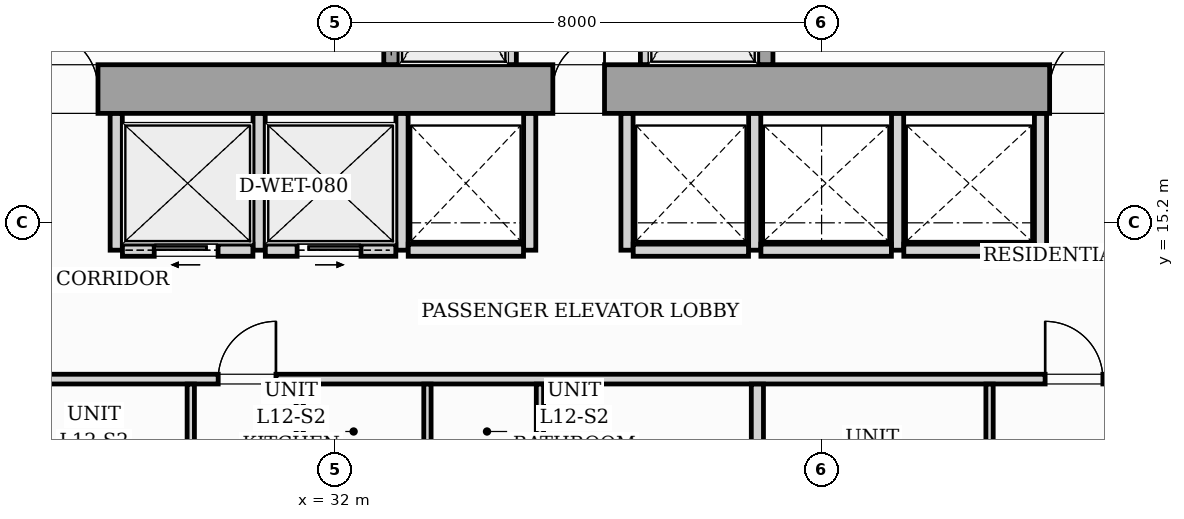
"""IFC4 building model, lengths in metres.
Left out: names, types, materials, properties, quantities, classifications, styles, units other than length and angle.
Written with IfcOpenShell. Run it as: python <this file> out.ifc"""

import sys

from ifc_helpers import new_model, si_unit, direction, frame, frame_2d, origin, origin_2d, place, context, subcontext, project, spatial, rectangle, i_section, extrude, source, transform, mapped, element, fill, save


model = new_model("IFC4")
c1 = context("Model", 3, precision=1e-05, world=origin(), true_north=direction((0.0, 1.0)))
c2 = subcontext(c1, "Body", "Model", "MODEL_VIEW")
j1 = project(units=[si_unit("LENGTHUNIT", "METRE"), si_unit("PLANEANGLEUNIT", "RADIAN")], contexts=[c1])
p1 = place(None, origin())
s1 = spatial("IfcSite", under=j1, at=p1, CompositionType="ELEMENT")
p2 = place(p1, origin())
s2 = spatial("IfcBuilding", under=s1, at=p2, CompositionType="ELEMENT")
p3 = place(p2, frame((0.0, 0.0, 45.4)))
s3 = spatial("IfcBuildingStorey", under=s2, at=p3, CompositionType="ELEMENT", Elevation=45.4)
m1 = source(origin(), c2, "Body", "SweptSolid", [
    extrude(i_section(OverallWidth=0.437, OverallDepth=0.514, WebThickness=0.061, FlangeThickness=0.097, FilletRadius=0.018, at=origin_2d()), origin(), (0.0, 0.0, 1.0), 3.196),
])
for number, where, z_axis, x_axis in (
    (1, (33.12, 17.4, 0.002), (0.0, 0.0, 1.0), (1.0, 0.0, 0.0)),
    (2, (38.88, 17.4, 0.002), (0.0, 0.0, 1.0), (1.0, 0.0, 0.0)),
):
    element("IfcColumn", number, at=place(p3, frame(where, z_axis=z_axis, x_axis=x_axis)), inside=s3, PredefinedType="PILASTER", context=c2, shape_type="MappedRepresentation", body=[
        mapped(m1, transform((0.0, 0.0, 0.0), scale=1.0)),
    ])
p4 = place(p3, frame((26.0, 17.4, 0.0), z_axis=(0.0, 0.0, 1.0), x_axis=(1.0, 0.0, 0.0)))
e3 = element("IfcWall", 3, at=p4, inside=s3, PredefinedType="SHEAR", context=c2, shape_type="SweptSolid", body=[
    extrude(rectangle(XDim=20.0, YDim=0.8, at=frame_2d((10.0, 0.0))), origin(), (0.0, 0.0, 1.0), 3.2),
])
p5 = place(p4, frame((1.15, 0.0, 0.0)))
e4 = element("IfcOpeningElement", 4, at=p5, cuts=e3, PredefinedType="OPENING", context=c2, shape_type="SweptSolid", body=[
    extrude(rectangle(XDim=0.95, YDim=2.06, at=frame_2d((0.475, 1.03))), frame((0.0, 0.41, 0.0), z_axis=(0.0, -1.0, 0.0), x_axis=(1.0, 0.0, 0.0)), (0.0, 0.0, 1.0), 0.82),
])
p6 = place(p4, frame((9.58, 0.0, 0.0)))
e5 = element("IfcOpeningElement", 5, at=p6, cuts=e3, PredefinedType="OPENING", context=c2, shape_type="SweptSolid", body=[
    extrude(rectangle(XDim=0.85, YDim=2.0, at=frame_2d((0.425, 1.0))), frame((0.0, 0.41, 0.0), z_axis=(0.0, -1.0, 0.0), x_axis=(1.0, 0.0, 0.0)), (0.0, 0.0, 1.0), 0.82),
])
p7 = place(p4, frame((17.75, 0.0, 0.0)))
e6 = element("IfcOpeningElement", 6, at=p7, cuts=e3, PredefinedType="OPENING", context=c2, shape_type="SweptSolid", body=[
    extrude(rectangle(XDim=0.95, YDim=2.06, at=frame_2d((0.475, 1.03))), frame((0.0, 0.41, 0.0), z_axis=(0.0, -1.0, 0.0), x_axis=(1.0, 0.0, 0.0)), (0.0, 0.0, 1.0), 0.82),
])
p8 = place(p3, frame((32.925, 17.802, 0.0), z_axis=(0.0, 0.0, 1.0), x_axis=(0.0, 1.0, 0.0)))
e7 = element("IfcWall", 7, at=p8, inside=s3, PredefinedType="SOLIDWALL", context=c2, shape_type="SweptSolid", body=[
    extrude(rectangle(XDim=2.646, YDim=0.25, at=frame_2d((1.323, 0.0))), origin(), (0.0, 0.0, 1.0), 3.2),
])
p9 = place(p8, frame((0.648, 0.0, 0.0)))
e8 = element("IfcOpeningElement", 8, at=p9, cuts=e7, PredefinedType="OPENING", context=c2, shape_type="SweptSolid", body=[
    extrude(rectangle(XDim=1.1, YDim=2.08, at=frame_2d((0.55, 1.04))), frame((0.0, 0.135, 0.0), z_axis=(0.0, -1.0, 0.0), x_axis=(1.0, 0.0, 0.0)), (0.0, 0.0, 1.0), 0.27),
])
for number, where, z_axis, x_axis in (
    (9, (34.9, 17.802, 0.0), (0.0, 0.0, 1.0), (0.0, 1.0, 0.0)),
    (10, (37.1, 17.802, 0.0), (0.0, 0.0, 1.0), (0.0, 1.0, 0.0)),
):
    element("IfcWall", number, at=place(p3, frame(where, z_axis=z_axis, x_axis=x_axis)), inside=s3, PredefinedType="PARTITIONING", context=c2, shape_type="SweptSolid", body=[
        extrude(rectangle(XDim=2.646, YDim=0.16, at=frame_2d((1.323, 0.0))), origin(), (0.0, 0.0, 1.0), 2.94),
    ])
p10 = place(p3, frame((39.075, 17.802, 0.0), z_axis=(0.0, 0.0, 1.0), x_axis=(0.0, 1.0, 0.0)))
e11 = element("IfcWall", 11, at=p10, inside=s3, PredefinedType="SOLIDWALL", context=c2, shape_type="SweptSolid", body=[
    extrude(rectangle(XDim=2.646, YDim=0.25, at=frame_2d((1.323, 0.0))), origin(), (0.0, 0.0, 1.0), 3.2),
])
p11 = place(p10, frame((0.648, 0.0, 0.0)))
e12 = element("IfcOpeningElement", 12, at=p11, cuts=e11, PredefinedType="OPENING", context=c2, shape_type="SweptSolid", body=[
    extrude(rectangle(XDim=1.1, YDim=2.08, at=frame_2d((0.55, 1.04))), frame((0.0, 0.135, 0.0), z_axis=(0.0, -1.0, 0.0), x_axis=(1.0, 0.0, 0.0)), (0.0, 0.0, 1.0), 0.27),
])
for number, where, z_axis, x_axis in (
    (13, (28.4, 14.75, 0.0), (0.0, 0.0, 1.0), (0.0, 1.0, 0.0)),
    (14, (30.75, 14.75, 0.0), (0.0, 0.0, 1.0), (0.0, 1.0, 0.0)),
    (15, (33.1, 14.75, 0.0), (0.0, 0.0, 1.0), (0.0, 1.0, 0.0)),
):
    element("IfcWall", number, at=place(p3, frame(where, z_axis=z_axis, x_axis=x_axis)), inside=s3, PredefinedType="PARTITIONING", context=c2, shape_type="SweptSolid", body=[
        extrude(rectangle(XDim=2.248, YDim=0.2, at=frame_2d((1.124, 0.0))), origin(), (0.0, 0.0, 1.0), 2.94),
    ])
p12 = place(p3, frame((28.502, 14.75, 0.0), z_axis=(0.0, 0.0, 1.0), x_axis=(1.0, 0.0, 0.0)))
e16 = element("IfcWall", 16, at=p12, inside=s3, PredefinedType="PARTITIONING", context=c2, shape_type="SweptSolid", body=[
    extrude(rectangle(XDim=2.146, YDim=0.2, at=frame_2d((1.073, 0.0))), origin(), (0.0, 0.0, 1.0), 2.94),
])
p13 = place(p12, frame((0.523, 0.0, 0.0)))
e17 = element("IfcOpeningElement", 17, at=p13, cuts=e16, PredefinedType="OPENING", context=c2, shape_type="SweptSolid", body=[
    extrude(rectangle(XDim=1.05, YDim=2.08, at=frame_2d((0.525, 1.04))), frame((0.0, 0.11, 0.0), z_axis=(0.0, -1.0, 0.0), x_axis=(1.0, 0.0, 0.0)), (0.0, 0.0, 1.0), 0.22),
])
p14 = place(p3, frame((30.852, 14.75, 0.0), z_axis=(0.0, 0.0, 1.0), x_axis=(1.0, 0.0, 0.0)))
e18 = element("IfcWall", 18, at=p14, inside=s3, PredefinedType="PARTITIONING", context=c2, shape_type="SweptSolid", body=[
    extrude(rectangle(XDim=2.146, YDim=0.2, at=frame_2d((1.073, 0.0))), origin(), (0.0, 0.0, 1.0), 2.94),
])
p15 = place(p14, frame((0.523, 0.0, 0.0)))
e19 = element("IfcOpeningElement", 19, at=p15, cuts=e18, PredefinedType="OPENING", context=c2, shape_type="SweptSolid", body=[
    extrude(rectangle(XDim=1.05, YDim=2.08, at=frame_2d((0.525, 1.04))), frame((0.0, 0.11, 0.0), z_axis=(0.0, -1.0, 0.0), x_axis=(1.0, 0.0, 0.0)), (0.0, 0.0, 1.0), 0.22),
])
p16 = place(p3, frame((35.2, 14.75, 0.0), z_axis=(0.0, 0.0, 1.0), x_axis=(0.0, 1.0, 0.0)))
e20 = element("IfcWall", 20, at=p16, inside=s3, PredefinedType="PARTITIONING", context=c2, shape_type="SweptSolid", body=[
    extrude(rectangle(XDim=2.248, YDim=0.2, at=frame_2d((1.124, 0.0))), origin(), (0.0, 0.0, 1.0), 2.94),
])
p17 = place(p3, frame((33.202, 14.75, 0.0), z_axis=(0.0, 0.0, 1.0), x_axis=(1.0, 0.0, 0.0)))
e21 = element("IfcWall", 21, at=p17, inside=s3, PredefinedType="PARTITIONING", context=c2, shape_type="SweptSolid", body=[
    extrude(rectangle(XDim=1.896, YDim=0.2, at=frame_2d((0.948, 0.0))), origin(), (0.0, 0.0, 1.0), 2.94),
])
for number, where, z_axis, x_axis in (
    (22, (36.8, 14.75, 0.0), (0.0, 0.0, 1.0), (0.0, 1.0, 0.0)),
    (23, (38.9, 14.75, 0.0), (0.0, 0.0, 1.0), (0.0, 1.0, 0.0)),
):
    element("IfcWall", number, at=place(p3, frame(where, z_axis=z_axis, x_axis=x_axis)), inside=s3, PredefinedType="PARTITIONING", context=c2, shape_type="SweptSolid", body=[
        extrude(rectangle(XDim=2.248, YDim=0.2, at=frame_2d((1.124, 0.0))), origin(), (0.0, 0.0, 1.0), 2.94),
    ])
p18 = place(p3, frame((36.902, 14.75, 0.0), z_axis=(0.0, 0.0, 1.0), x_axis=(1.0, 0.0, 0.0)))
e24 = element("IfcWall", 24, at=p18, inside=s3, PredefinedType="PARTITIONING", context=c2, shape_type="SweptSolid", body=[
    extrude(rectangle(XDim=1.896, YDim=0.2, at=frame_2d((0.948, 0.0))), origin(), (0.0, 0.0, 1.0), 2.94),
])
for number, where, z_axis, x_axis in (
    (25, (41.25, 14.75, 0.0), (0.0, 0.0, 1.0), (0.0, 1.0, 0.0)),
    (26, (43.6, 14.75, 0.0), (0.0, 0.0, 1.0), (0.0, 1.0, 0.0)),
):
    element("IfcWall", number, at=place(p3, frame(where, z_axis=z_axis, x_axis=x_axis)), inside=s3, PredefinedType="PARTITIONING", context=c2, shape_type="SweptSolid", body=[
        extrude(rectangle(XDim=2.248, YDim=0.2, at=frame_2d((1.124, 0.0))), origin(), (0.0, 0.0, 1.0), 2.94),
    ])
for number, where, z_axis, x_axis in (
    (27, (39.002, 14.75, 0.0), (0.0, 0.0, 1.0), (1.0, 0.0, 0.0)),
    (28, (41.352, 14.75, 0.0), (0.0, 0.0, 1.0), (1.0, 0.0, 0.0)),
):
    element("IfcWall", number, at=place(p3, frame(where, z_axis=z_axis, x_axis=x_axis)), inside=s3, PredefinedType="PARTITIONING", context=c2, shape_type="SweptSolid", body=[
        extrude(rectangle(XDim=2.146, YDim=0.2, at=frame_2d((1.073, 0.0))), origin(), (0.0, 0.0, 1.0), 2.94),
    ])
p19 = place(p3, frame((15.2, 12.63, 0.0), z_axis=(0.0, 0.0, 1.0), x_axis=(1.0, 0.0, 0.0)))
e29 = element("IfcWall", 29, at=p19, inside=s3, PredefinedType="PARTITIONING", context=c2, shape_type="SweptSolid", body=[
    extrude(rectangle(XDim=37.1, YDim=0.16, at=frame_2d((18.55, 0.0))), origin(), (0.0, 0.0, 1.0), 2.94),
])
p20 = place(p19, frame((1.572, 0.0, 0.0)))
e30 = element("IfcOpeningElement", 30, at=p20, cuts=e29, PredefinedType="OPENING", context=c2, shape_type="SweptSolid", body=[
    extrude(rectangle(XDim=0.95, YDim=2.06, at=frame_2d((0.475, 1.03))), frame((0.0, 0.09, 0.0), z_axis=(0.0, -1.0, 0.0), x_axis=(1.0, 0.0, 0.0)), (0.0, 0.0, 1.0), 0.18),
])
p21 = place(p19, frame((14.877, 0.0, 0.0)))
e31 = element("IfcOpeningElement", 31, at=p21, cuts=e29, PredefinedType="OPENING", context=c2, shape_type="SweptSolid", body=[
    extrude(rectangle(XDim=0.95, YDim=2.06, at=frame_2d((0.475, 1.03))), frame((0.0, 0.09, 0.0), z_axis=(0.0, -1.0, 0.0), x_axis=(1.0, 0.0, 0.0)), (0.0, 0.0, 1.0), 0.18),
])
p22 = place(p19, frame((28.476, 0.0, 0.0)))
e32 = element("IfcOpeningElement", 32, at=p22, cuts=e29, PredefinedType="OPENING", context=c2, shape_type="SweptSolid", body=[
    extrude(rectangle(XDim=0.95, YDim=2.06, at=frame_2d((0.475, 1.03))), frame((0.0, 0.09, 0.0), z_axis=(0.0, -1.0, 0.0), x_axis=(1.0, 0.0, 0.0)), (0.0, 0.0, 1.0), 0.18),
])
p23 = place(p3, frame((35.368, 2.78, 0.0), z_axis=(0.0, 0.0, 1.0), x_axis=(0.0, 1.0, 0.0)))
e33 = element("IfcWall", 33, at=p23, inside=s3, PredefinedType="PARTITIONING", context=c2, shape_type="SweptSolid", body=[
    extrude(rectangle(XDim=9.768, YDim=0.12, at=frame_2d((4.884, 0.0))), origin(), (0.0, 0.0, 1.0), 2.94),
])
p24 = place(p23, frame((6.5, 0.0, 0.0)))
e34 = element("IfcOpeningElement", 34, at=p24, cuts=e33, PredefinedType="OPENING", context=c2, shape_type="SweptSolid", body=[
    extrude(rectangle(XDim=0.9, YDim=2.05, at=frame_2d((0.45, 1.025))), frame((0.0, 0.07, 0.0), z_axis=(0.0, -1.0, 0.0), x_axis=(1.0, 0.0, 0.0)), (0.0, 0.0, 1.0), 0.14),
])
for number, where, z_axis, x_axis in (
    (35, (33.518, 10.442, 0.0), (0.0, 0.0, 1.0), (0.0, 1.0, 0.0)),
    (36, (31.418, 10.442, 0.0), (0.0, 0.0, 1.0), (0.0, 1.0, 0.0)),
):
    element("IfcWall", number, at=place(p3, frame(where, z_axis=z_axis, x_axis=x_axis)), inside=s3, PredefinedType="PARTITIONING", context=c2, shape_type="SweptSolid", body=[
        extrude(rectangle(XDim=2.106, YDim=0.12, at=frame_2d((1.053, 0.0))), origin(), (0.0, 0.0, 1.0), 2.94),
    ])
p25 = place(p3, frame((29.626, 2.78, 0.0), z_axis=(0.0, 0.0, 1.0), x_axis=(0.0, 1.0, 0.0)))
e37 = element("IfcWall", 37, at=p25, inside=s3, PredefinedType="PARTITIONING", context=c2, shape_type="SweptSolid", body=[
    extrude(rectangle(XDim=9.768, YDim=0.12, at=frame_2d((4.884, 0.0))), origin(), (0.0, 0.0, 1.0), 2.94),
])
p26 = place(p25, frame((4.54, 0.0, 0.0)))
e38 = element("IfcOpeningElement", 38, at=p26, cuts=e37, PredefinedType="OPENING", context=c2, shape_type="SweptSolid", body=[
    extrude(rectangle(XDim=0.85, YDim=2.05, at=frame_2d((0.425, 1.025))), frame((0.0, 0.07, 0.0), z_axis=(0.0, -1.0, 0.0), x_axis=(1.0, 0.0, 0.0)), (0.0, 0.0, 1.0), 0.14),
])
p27 = place(p3, frame((38.944, 2.78, 0.0), z_axis=(0.0, 0.0, 1.0), x_axis=(0.0, 1.0, 0.0)))
e39 = element("IfcWall", 39, at=p27, inside=s3, PredefinedType="PARTITIONING", context=c2, shape_type="SweptSolid", body=[
    extrude(rectangle(XDim=9.768, YDim=0.2, at=frame_2d((4.884, 0.0))), origin(), (0.0, 0.0, 1.0), 2.94),
])
p28 = place(p3, frame((42.762, 2.962, 0.0), z_axis=(0.0, 0.0, 1.0), x_axis=(0.0, 1.0, 0.0)))
e40 = element("IfcWall", 40, at=p28, inside=s3, PredefinedType="PARTITIONING", context=c2, shape_type="SweptSolid", body=[
    extrude(rectangle(XDim=9.586, YDim=0.12, at=frame_2d((4.793, 0.0))), origin(), (0.0, 0.0, 1.0), 2.94),
])
p29 = place(p28, frame((4.358, 0.0, 0.0)))
e41 = element("IfcOpeningElement", 41, at=p29, cuts=e40, PredefinedType="OPENING", context=c2, shape_type="SweptSolid", body=[
    extrude(rectangle(XDim=0.85, YDim=2.05, at=frame_2d((0.425, 1.025))), frame((0.0, 0.07, 0.0), z_axis=(0.0, -1.0, 0.0), x_axis=(1.0, 0.0, 0.0)), (0.0, 0.0, 1.0), 0.14),
])
m2 = source(origin(), c2, "Body", "SweptSolid", [
    extrude(rectangle(XDim=0.95, YDim=2.06, at=frame_2d((0.475, 1.03))), frame((0.0, 0.025, 0.0), z_axis=(0.0, -1.0, 0.0), x_axis=(1.0, 0.0, 0.0)), (0.0, 0.0, 1.0), 0.05),
])
p30 = place(p5, origin())
e42 = element("IfcDoor", 42, at=p30, inside=s3, OperationType="SINGLE_SWING_LEFT", PredefinedType="DOOR", context=c2, shape_type="MappedRepresentation", body=[
    mapped(m2, transform((0.0, 0.0, 0.0), scale=1.0)),
])
fill(e4, e42)
m3 = source(origin(), c2, "Body", "SweptSolid", [
    extrude(rectangle(XDim=0.85, YDim=2.0, at=frame_2d((0.425, 1.0))), frame((0.0, 0.025, 0.0), z_axis=(0.0, -1.0, 0.0), x_axis=(1.0, 0.0, 0.0)), (0.0, 0.0, 1.0), 0.05),
])
p31 = place(p6, origin())
e43 = element("IfcDoor", 43, at=p31, inside=s3, OperationType="SINGLE_SWING_RIGHT", PredefinedType="DOOR", context=c2, shape_type="MappedRepresentation", body=[
    mapped(m3, transform((0.0, 0.0, 0.0), scale=1.0)),
])
fill(e5, e43)
p32 = place(p7, origin())
e44 = element("IfcDoor", 44, at=p32, inside=s3, OperationType="SINGLE_SWING_RIGHT", PredefinedType="DOOR", context=c2, shape_type="MappedRepresentation", body=[
    mapped(m2, transform((0.0, 0.0, 0.0), scale=1.0)),
])
fill(e6, e44)
m4 = source(origin(), c2, "Body", "SweptSolid", [
    extrude(rectangle(XDim=1.05, YDim=2.08, at=frame_2d((0.525, 1.04))), frame((0.0, 0.025, 0.0), z_axis=(0.0, -1.0, 0.0), x_axis=(1.0, 0.0, 0.0)), (0.0, 0.0, 1.0), 0.05),
])
p33 = place(p13, origin())
e45 = element("IfcDoor", 45, at=p33, inside=s3, OperationType="SLIDING_TO_LEFT", PredefinedType="DOOR", context=c2, shape_type="MappedRepresentation", body=[
    mapped(m4, transform((0.0, 0.0, 0.0), scale=1.0)),
])
fill(e17, e45)
p34 = place(p15, origin())
e46 = element("IfcDoor", 46, at=p34, inside=s3, OperationType="SLIDING_TO_RIGHT", PredefinedType="DOOR", context=c2, shape_type="MappedRepresentation", body=[
    mapped(m4, transform((0.0, 0.0, 0.0), scale=1.0)),
])
fill(e19, e46)
m5 = source(origin(), c2, "Body", "SweptSolid", [
    extrude(rectangle(XDim=0.95, YDim=2.06, at=frame_2d((0.475, 1.03))), frame((0.0, 0.025, 0.0), z_axis=(0.0, -1.0, 0.0), x_axis=(1.0, 0.0, 0.0)), (0.0, 0.0, 1.0), 0.05),
])
p35 = place(p21, origin())
e47 = element("IfcDoor", 47, at=p35, inside=s3, OperationType="SINGLE_SWING_RIGHT", PredefinedType="DOOR", context=c2, shape_type="MappedRepresentation", body=[
    mapped(m5, transform((0.0, 0.0, 0.0), scale=1.0)),
])
fill(e31, e47)
p36 = place(p22, origin())
e48 = element("IfcDoor", 48, at=p36, inside=s3, OperationType="SINGLE_SWING_LEFT", PredefinedType="DOOR", context=c2, shape_type="MappedRepresentation", body=[
    mapped(m5, transform((0.0, 0.0, 0.0), scale=1.0)),
])
fill(e32, e48)
save(model, sys.argv[1])
